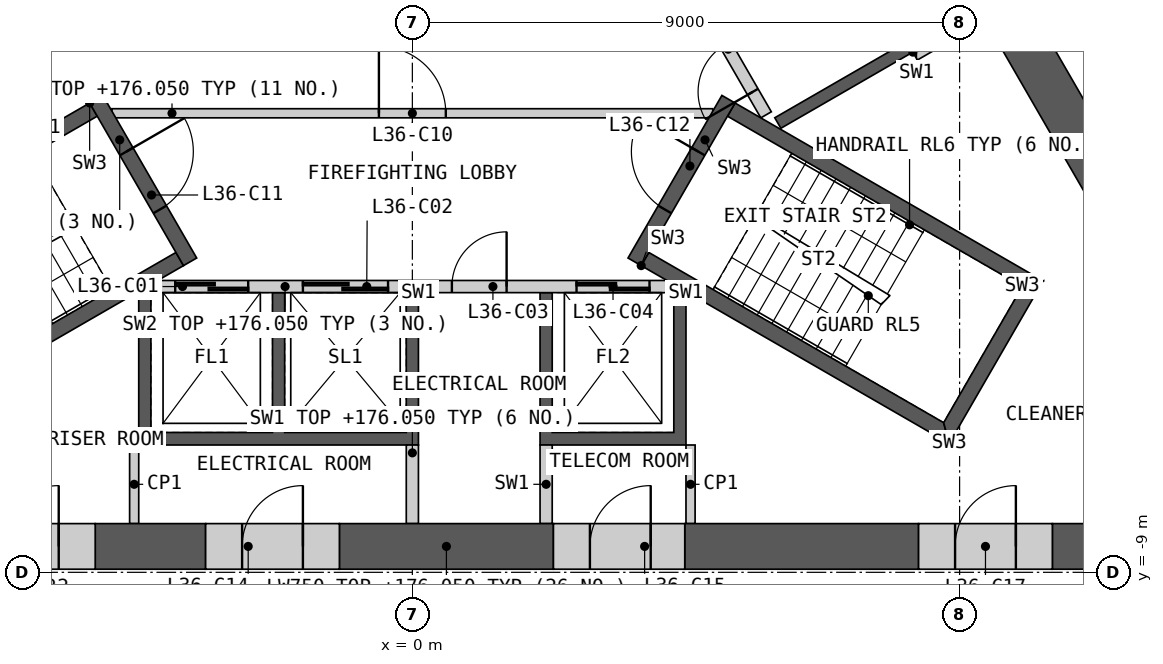
"""IFC4 building model, lengths in metres.
Left out: names, types, materials, properties, quantities, classifications, styles, units other than length and angle.
Written with IfcOpenShell. Run it as: python <this file> out.ifc"""

import sys

from ifc_helpers import new_model, si_unit, direction, frame, frame_2d, origin, place, context, subcontext, project, spatial, polyline, rectangle, outline, extrude, element, fill, save


model = new_model("IFC4")
c1 = context("Model", 3, precision=1e-05, world=origin(), true_north=direction((0.0, 1.0)))
c2 = subcontext(c1, "Body", "Model", "MODEL_VIEW")
j1 = project(units=[si_unit("LENGTHUNIT", "METRE"), si_unit("PLANEANGLEUNIT", "RADIAN")], contexts=[c1])
p1 = place(None, origin())
s1 = spatial("IfcSite", under=j1, at=p1, CompositionType="ELEMENT")
p2 = place(p1, origin())
s2 = spatial("IfcBuilding", under=s1, at=p2, CompositionType="ELEMENT")
p3 = place(p2, frame((0.0, 0.0, 172.8)))
s3 = spatial("IfcBuildingStorey", under=s2, at=p3, CompositionType="ELEMENT", Elevation=172.8)
p4 = place(p3, origin())
e1 = element("IfcWall", 1, at=p4, inside=s3, PredefinedType="SHEAR", context=c2, shape_type="SweptSolid", body=[
    extrude(outline(polyline([(4.5, -4.4), (4.5, -6.906), (2.1, -6.906), (2.1, -4.4), (2.3, -4.4), (2.3, -6.7), (4.3, -6.7), (4.3, -4.4), (4.5, -4.4)])), origin(), (0.0, 0.0, 1.0), 3.25),
])
p5 = place(p3, origin())
e2 = element("IfcWall", 2, at=p5, inside=s3, PredefinedType="SHEAR", context=c2, shape_type="SweptSolid", body=[
    extrude(outline(polyline([(0.1, -4.4), (0.1, -6.906), (-4.5, -6.906), (-4.5, -4.4), (-4.3, -4.4), (-4.3, -6.7), (-2.3, -6.7), (-2.3, -4.4), (-2.1, -4.4), (-2.1, -6.7), (-0.1, -6.7), (-0.1, -4.4), (0.1, -4.4)])), origin(), (0.0, 0.0, 1.0), 3.25),
])
p6 = place(p3, frame((-4.187, -4.3, 0.0), z_axis=(0.0, 0.0, 1.0), x_axis=(1.0, 0.0, 0.0)))
e3 = element("IfcWall", 3, at=p6, inside=s3, PredefinedType="SOLIDWALL", context=c2, shape_type="SweptSolid", body=[
    extrude(rectangle(XDim=8.373, YDim=0.2, at=frame_2d((4.187, 0.0))), origin(), (0.0, 0.0, 1.0), 3.25),
])
p7 = place(p6, frame((0.287, 0.0, 0.0)))
e4 = element("IfcOpeningElement", 4, at=p7, cuts=e3, PredefinedType="OPENING", context=c2, shape_type="SweptSolid", body=[
    extrude(rectangle(XDim=1.2, YDim=2.1, at=frame_2d((0.6, 1.05))), frame((0.0, 0.11, 0.0), z_axis=(0.0, -1.0, 0.0), x_axis=(1.0, 0.0, 0.0)), (0.0, 0.0, 1.0), 0.22),
])
p8 = place(p6, frame((2.387, 0.0, 0.0)))
e5 = element("IfcOpeningElement", 5, at=p8, cuts=e3, PredefinedType="OPENING", context=c2, shape_type="SweptSolid", body=[
    extrude(rectangle(XDim=1.4, YDim=2.1, at=frame_2d((0.7, 1.05))), frame((0.0, 0.11, 0.0), z_axis=(0.0, -1.0, 0.0), x_axis=(1.0, 0.0, 0.0)), (0.0, 0.0, 1.0), 0.22),
])
p9 = place(p6, frame((4.837, 0.0, 0.0)))
e6 = element("IfcOpeningElement", 6, at=p9, cuts=e3, PredefinedType="OPENING", context=c2, shape_type="SweptSolid", body=[
    extrude(rectangle(XDim=0.9, YDim=2.1, at=frame_2d((0.45, 1.05))), frame((0.0, 0.11, 0.0), z_axis=(0.0, -1.0, 0.0), x_axis=(1.0, 0.0, 0.0)), (0.0, 0.0, 1.0), 0.22),
])
p10 = place(p6, frame((6.887, 0.0, 0.0)))
e7 = element("IfcOpeningElement", 7, at=p10, cuts=e3, PredefinedType="OPENING", context=c2, shape_type="SweptSolid", body=[
    extrude(rectangle(XDim=1.2, YDim=2.1, at=frame_2d((0.6, 1.05))), frame((0.0, 0.11, 0.0), z_axis=(0.0, -1.0, 0.0), x_axis=(1.0, 0.0, 0.0)), (0.0, 0.0, 1.0), 0.22),
])
for number, where, z_axis, x_axis in (
    (8, (0.0, -6.906, 0.0), (0.0, 0.0, 1.0), (0.0, -1.0, 0.0)),
    (9, (2.2, -6.906, 0.0), (0.0, 0.0, 1.0), (0.0, -1.0, 0.0)),
):
    element("IfcWall", number, at=place(p3, frame(where, z_axis=z_axis, x_axis=x_axis)), inside=s3, PredefinedType="SHEAR", context=c2, shape_type="SweptSolid", body=[
        extrude(rectangle(XDim=1.293, YDim=0.2, at=frame_2d((0.646, 0.0))), origin(), (0.0, 0.0, 1.0), 3.25),
    ])
p11 = place(p3, origin())
e10 = element("IfcWall", 10, at=p11, inside=s3, PredefinedType="SHEAR", context=c2, shape_type="SweptSolid", body=[
    extrude(outline(polyline([(8.231, -0.444), (6.061, -1.697), (5.96, -1.524), (8.131, -0.271), (8.231, -0.444)])), origin(), (0.0, 0.0, 1.0), 3.25),
])
p12 = place(p3, frame((5.817, -1.476, 0.0), z_axis=(0.0, 0.0, 1.0), x_axis=(-0.500002616675, 0.866023893041, 0.0)))
e11 = element("IfcWall", 11, at=p12, inside=s3, PredefinedType="SOLIDWALL", context=c2, shape_type="SweptSolid", body=[
    extrude(rectangle(XDim=8.373, YDim=0.2, at=frame_2d((4.187, 0.0))), origin(), (0.0, 0.0, 1.0), 3.25),
])
p13 = place(p12, frame((0.437, 0.0, 0.0)))
e12 = element("IfcOpeningElement", 12, at=p13, cuts=e11, PredefinedType="OPENING", context=c2, shape_type="SweptSolid", body=[
    extrude(rectangle(XDim=0.9, YDim=2.1, at=frame_2d((0.45, 1.05))), frame((0.0, 0.11, 0.0), z_axis=(0.0, -1.0, 0.0), x_axis=(1.0, 0.0, 0.0)), (0.0, 0.0, 1.0), 0.22),
])
p14 = place(p12, frame((3.737, 0.0, 0.0)))
e13 = element("IfcOpeningElement", 13, at=p14, cuts=e11, PredefinedType="OPENING", context=c2, shape_type="SweptSolid", body=[
    extrude(rectangle(XDim=0.9, YDim=2.1, at=frame_2d((0.45, 1.05))), frame((0.0, 0.11, 0.0), z_axis=(0.0, -1.0, 0.0), x_axis=(1.0, 0.0, 0.0)), (0.0, 0.0, 1.0), 0.22),
])
p15 = place(p12, frame((6.937, 0.0, 0.0)))
e14 = element("IfcOpeningElement", 14, at=p15, cuts=e11, PredefinedType="OPENING", context=c2, shape_type="SweptSolid", body=[
    extrude(rectangle(XDim=1.1, YDim=2.1, at=frame_2d((0.55, 1.05))), frame((0.0, 0.11, 0.0), z_axis=(0.0, -1.0, 0.0), x_axis=(1.0, 0.0, 0.0)), (0.0, 0.0, 1.0), 0.22),
])
p16 = place(p3, frame((-4.941, -1.45, 0.0), z_axis=(0.0, 0.0, 1.0), x_axis=(1.0, 0.0, 0.0)))
e15 = element("IfcWall", 15, at=p16, inside=s3, PredefinedType="PARTITIONING", context=c2, shape_type="SweptSolid", body=[
    extrude(rectangle(XDim=9.882, YDim=0.15, at=frame_2d((4.941, 0.0))), origin(), (0.0, 0.0, 1.0), 3.25),
])
p17 = place(p16, frame((4.391, 0.0, 0.0)))
e16 = element("IfcOpeningElement", 16, at=p17, cuts=e15, PredefinedType="OPENING", context=c2, shape_type="SweptSolid", body=[
    extrude(rectangle(XDim=1.1, YDim=2.1, at=frame_2d((0.55, 1.05))), frame((0.0, 0.085, 0.0), z_axis=(0.0, -1.0, 0.0), x_axis=(1.0, 0.0, 0.0)), (0.0, 0.0, 1.0), 0.17),
])
p18 = place(p3, origin())
e17 = element("IfcWall", 17, at=p18, inside=s3, PredefinedType="SHEAR", context=c2, shape_type="SweptSolid", body=[
    extrude(outline(polyline([(-5.307, -1.281), (-10.374, -4.206), (-10.032, -4.298), (-5.182, -1.498), (-5.307, -1.281)])), origin(), (0.0, 0.0, 1.0), 3.25),
])
p19 = place(p3, origin())
e18 = element("IfcWall", 18, at=p19, inside=s3, PredefinedType="SHEAR", context=c2, shape_type="SweptSolid", body=[
    extrude(outline(polyline([(-8.738, -6.539), (-8.83, -6.881), (-3.763, -3.956), (-3.888, -3.739), (-8.738, -6.539)])), origin(), (0.0, 0.0, 1.0), 3.25),
])
p20 = place(p3, frame((-5.199, -1.219, 0.0), z_axis=(0.0, 0.0, 1.0), x_axis=(0.499982516597, -0.866035497597, 0.0)))
e19 = element("IfcWall", 19, at=p20, inside=s3, PredefinedType="SHEAR", context=c2, shape_type="SweptSolid", body=[
    extrude(rectangle(XDim=3.088, YDim=0.25, at=frame_2d((1.544, 0.0))), origin(), (0.0, 0.0, 1.0), 3.25),
])
p21 = place(p20, frame((0.994, 0.0, 0.0)))
e20 = element("IfcOpeningElement", 20, at=p21, cuts=e19, PredefinedType="OPENING", context=c2, shape_type="SweptSolid", body=[
    extrude(rectangle(XDim=1.1, YDim=2.1, at=frame_2d((0.55, 1.05))), frame((0.0, 0.135, 0.0), z_axis=(0.0, -1.0, 0.0), x_axis=(1.0, 0.0, 0.0)), (0.0, 0.0, 1.0), 0.27),
])
p22 = place(p3, origin())
e21 = element("IfcWall", 21, at=p22, inside=s3, PredefinedType="SHEAR", context=c2, shape_type="SweptSolid", body=[
    extrude(outline(polyline([(3.763, -3.956), (8.83, -6.881), (8.738, -6.539), (3.888, -3.739), (3.763, -3.956)])), origin(), (0.0, 0.0, 1.0), 3.25),
])
p23 = place(p3, origin())
e22 = element("IfcWall", 22, at=p23, inside=s3, PredefinedType="SHEAR", context=c2, shape_type="SweptSolid", body=[
    extrude(outline(polyline([(8.83, -6.881), (10.374, -4.206), (10.032, -4.298), (8.738, -6.539), (8.83, -6.881)])), origin(), (0.0, 0.0, 1.0), 3.25),
])
p24 = place(p3, origin())
e23 = element("IfcWall", 23, at=p24, inside=s3, PredefinedType="SHEAR", context=c2, shape_type="SweptSolid", body=[
    extrude(outline(polyline([(10.032, -4.298), (10.374, -4.206), (5.307, -1.281), (5.182, -1.498), (10.032, -4.298)])), origin(), (0.0, 0.0, 1.0), 3.25),
])
p25 = place(p3, frame((3.655, -3.893, 0.0), z_axis=(0.0, 0.0, 1.0), x_axis=(0.499982516597, 0.866035497597, 0.0)))
e24 = element("IfcWall", 24, at=p25, inside=s3, PredefinedType="SHEAR", context=c2, shape_type="SweptSolid", body=[
    extrude(rectangle(XDim=3.088, YDim=0.25, at=frame_2d((1.544, 0.0))), origin(), (0.0, 0.0, 1.0), 3.25),
])
p26 = place(p25, frame((0.994, 0.0, 0.0)))
e25 = element("IfcOpeningElement", 25, at=p26, cuts=e24, PredefinedType="OPENING", context=c2, shape_type="SweptSolid", body=[
    extrude(rectangle(XDim=1.1, YDim=2.1, at=frame_2d((0.55, 1.05))), frame((0.0, 0.135, 0.0), z_axis=(0.0, -1.0, 0.0), x_axis=(1.0, 0.0, 0.0)), (0.0, 0.0, 1.0), 0.27),
])
for number, where, z_axis, x_axis in (
    (26, (4.575, -6.906, 0.0), (0.0, 0.0, 1.0), (0.0, -1.0, 0.0)),
    (27, (-4.575, -6.906, 0.0), (0.0, 0.0, 1.0), (0.0, -1.0, 0.0)),
    (28, (8.268, -0.509, 0.0), (0.0, 0.0, 1.0), (0.866, 0.5, 0.0)),
):
    element("IfcWall", number, at=place(p3, frame(where, z_axis=z_axis, x_axis=x_axis)), inside=s3, PredefinedType="PARTITIONING", context=c2, shape_type="SweptSolid", body=[
        extrude(rectangle(XDim=1.293, YDim=0.15, at=frame_2d((0.646, 0.0))), origin(), (0.0, 0.0, 1.0), 3.25),
    ])
p27 = place(p3, frame((4.48, -8.574, 0.0), z_axis=(0.0, 0.0, 1.0), x_axis=(1.0, 0.0, 0.0)))
e29 = element("IfcWall", 29, at=p27, inside=s3, PredefinedType="SHEAR", context=c2, shape_type="SweptSolid", body=[
    extrude(rectangle(XDim=3.845, YDim=0.75, at=frame_2d((1.923, 0.0))), origin(), (0.0, 0.0, 1.0), 3.25),
])
p28 = place(p3, frame((10.525, -8.574, 0.0), z_axis=(0.0, 0.0, 1.0), x_axis=(1.0, 0.0, 0.0)))
e30 = element("IfcWall", 30, at=p28, inside=s3, PredefinedType="SHEAR", context=c2, shape_type="SweptSolid", body=[
    extrude(rectangle(XDim=3.676, YDim=0.75, at=frame_2d((1.838, 0.0))), origin(), (0.0, 0.0, 1.0), 3.25),
])
p29 = place(p3, frame((-1.2, -8.574, 0.0), z_axis=(0.0, 0.0, 1.0), x_axis=(1.0, 0.0, 0.0)))
e31 = element("IfcWall", 31, at=p29, inside=s3, PredefinedType="SHEAR", context=c2, shape_type="SweptSolid", body=[
    extrude(rectangle(XDim=3.52, YDim=0.75, at=frame_2d((1.76, 0.0))), origin(), (0.0, 0.0, 1.0), 3.25),
])
p30 = place(p3, frame((-5.216, -8.574, 0.0), z_axis=(0.0, 0.0, 1.0), x_axis=(1.0, 0.0, 0.0)))
e32 = element("IfcWall", 32, at=p30, inside=s3, PredefinedType="SHEAR", context=c2, shape_type="SweptSolid", body=[
    extrude(rectangle(XDim=1.816, YDim=0.75, at=frame_2d((0.908, 0.0))), origin(), (0.0, 0.0, 1.0), 3.25),
])
p31 = place(p3, frame((14.526, -8.011, 0.0), z_axis=(0.0, 0.0, 1.0), x_axis=(-0.499994855372, 0.866028374016, 0.0)))
e33 = element("IfcWall", 33, at=p31, inside=s3, PredefinedType="SHEAR", context=c2, shape_type="SweptSolid", body=[
    extrude(rectangle(XDim=14.301, YDim=0.75, at=frame_2d((7.15, 0.0))), origin(), (0.0, 0.0, 1.0), 3.25),
])
p32 = place(p3, frame((-3.4, -8.574, 0.0), z_axis=(0.0, 0.0, 1.0), x_axis=(1.0, 0.0, 0.0)))
e34 = element("IfcWall", 34, at=p32, inside=s3, PredefinedType="SHEAR", context=c2, shape_type="SweptSolid", body=[
    extrude(rectangle(XDim=2.2, YDim=0.75, at=frame_2d((1.1, 0.0))), origin(), (0.0, 0.0, 1.0), 3.25),
])
p33 = place(p32, frame((0.6, 0.0, 0.0)))
e35 = element("IfcOpeningElement", 35, at=p33, cuts=e34, PredefinedType="OPENING", context=c2, shape_type="SweptSolid", body=[
    extrude(rectangle(XDim=1.0, YDim=2.1, at=frame_2d((0.5, 1.05))), frame((0.0, 0.385, 0.0), z_axis=(0.0, -1.0, 0.0), x_axis=(1.0, 0.0, 0.0)), (0.0, 0.0, 1.0), 0.77),
])
p34 = place(p3, frame((2.32, -8.574, 0.0), z_axis=(0.0, 0.0, 1.0), x_axis=(1.0, 0.0, 0.0)))
e36 = element("IfcWall", 36, at=p34, inside=s3, PredefinedType="SHEAR", context=c2, shape_type="SweptSolid", body=[
    extrude(rectangle(XDim=2.16, YDim=0.75, at=frame_2d((1.08, 0.0))), origin(), (0.0, 0.0, 1.0), 3.25),
])
p35 = place(p34, frame((0.6, 0.0, 0.0)))
e37 = element("IfcOpeningElement", 37, at=p35, cuts=e36, PredefinedType="OPENING", context=c2, shape_type="SweptSolid", body=[
    extrude(rectangle(XDim=1.0, YDim=2.1, at=frame_2d((0.5, 1.05))), frame((0.0, 0.385, 0.0), z_axis=(0.0, -1.0, 0.0), x_axis=(1.0, 0.0, 0.0)), (0.0, 0.0, 1.0), 0.77),
])
p36 = place(p3, frame((8.325, -8.574, 0.0), z_axis=(0.0, 0.0, 1.0), x_axis=(1.0, 0.0, 0.0)))
e38 = element("IfcWall", 38, at=p36, inside=s3, PredefinedType="SHEAR", context=c2, shape_type="SweptSolid", body=[
    extrude(rectangle(XDim=2.2, YDim=0.75, at=frame_2d((1.1, 0.0))), origin(), (0.0, 0.0, 1.0), 3.25),
])
p37 = place(p36, frame((0.6, 0.0, 0.0)))
e39 = element("IfcOpeningElement", 39, at=p37, cuts=e38, PredefinedType="OPENING", context=c2, shape_type="SweptSolid", body=[
    extrude(rectangle(XDim=1.0, YDim=2.1, at=frame_2d((0.5, 1.05))), frame((0.0, 0.385, 0.0), z_axis=(0.0, -1.0, 0.0), x_axis=(1.0, 0.0, 0.0)), (0.0, 0.0, 1.0), 0.77),
])
p38 = place(p3, frame((-7.416, -8.574, 0.0), z_axis=(0.0, 0.0, 1.0), x_axis=(1.0, 0.0, 0.0)))
e40 = element("IfcWall", 40, at=p38, inside=s3, PredefinedType="SHEAR", context=c2, shape_type="SweptSolid", body=[
    extrude(rectangle(XDim=2.2, YDim=0.75, at=frame_2d((1.1, 0.0))), origin(), (0.0, 0.0, 1.0), 3.25),
])
p39 = place(p38, frame((0.6, 0.0, 0.0)))
e41 = element("IfcOpeningElement", 41, at=p39, cuts=e40, PredefinedType="OPENING", context=c2, shape_type="SweptSolid", body=[
    extrude(rectangle(XDim=1.0, YDim=2.1, at=frame_2d((0.5, 1.05))), frame((0.0, 0.385, 0.0), z_axis=(0.0, -1.0, 0.0), x_axis=(1.0, 0.0, 0.0)), (0.0, 0.0, 1.0), 0.77),
])
p40 = place(p7, origin())
e42 = element("IfcDoor", 42, at=p40, inside=s3, OperationType="SLIDING_TO_LEFT", PredefinedType="DOOR", context=c2, shape_type="SweptSolid", body=[
    extrude(rectangle(XDim=1.2, YDim=2.1, at=frame_2d((0.6, 1.05))), frame((0.0, 0.025, 0.0), z_axis=(0.0, -1.0, 0.0), x_axis=(1.0, 0.0, 0.0)), (0.0, 0.0, 1.0), 0.05),
])
fill(e4, e42)
p41 = place(p8, origin())
e43 = element("IfcDoor", 43, at=p41, inside=s3, OperationType="SLIDING_TO_LEFT", PredefinedType="DOOR", context=c2, shape_type="SweptSolid", body=[
    extrude(rectangle(XDim=1.4, YDim=2.1, at=frame_2d((0.7, 1.05))), frame((0.0, 0.025, 0.0), z_axis=(0.0, -1.0, 0.0), x_axis=(1.0, 0.0, 0.0)), (0.0, 0.0, 1.0), 0.05),
])
fill(e5, e43)
p42 = place(p9, origin())
e44 = element("IfcDoor", 44, at=p42, inside=s3, OperationType="SINGLE_SWING_RIGHT", PredefinedType="DOOR", context=c2, shape_type="SweptSolid", body=[
    extrude(rectangle(XDim=0.9, YDim=2.1, at=frame_2d((0.45, 1.05))), frame((0.0, 0.025, 0.0), z_axis=(0.0, -1.0, 0.0), x_axis=(1.0, 0.0, 0.0)), (0.0, 0.0, 1.0), 0.05),
])
fill(e6, e44)
p43 = place(p10, origin())
e45 = element("IfcDoor", 45, at=p43, inside=s3, OperationType="SLIDING_TO_LEFT", PredefinedType="DOOR", context=c2, shape_type="SweptSolid", body=[
    extrude(rectangle(XDim=1.2, YDim=2.1, at=frame_2d((0.6, 1.05))), frame((0.0, 0.025, 0.0), z_axis=(0.0, -1.0, 0.0), x_axis=(1.0, 0.0, 0.0)), (0.0, 0.0, 1.0), 0.05),
])
fill(e7, e45)
p44 = place(p13, origin())
e46 = element("IfcDoor", 46, at=p44, inside=s3, OperationType="SINGLE_SWING_LEFT", PredefinedType="DOOR", context=c2, shape_type="SweptSolid", body=[
    extrude(rectangle(XDim=0.9, YDim=2.1, at=frame_2d((0.45, 1.05))), frame((0.0, 0.025, 0.0), z_axis=(0.0, -1.0, 0.0), x_axis=(1.0, 0.0, 0.0)), (0.0, 0.0, 1.0), 0.05),
])
fill(e12, e46)
p45 = place(p17, origin())
e47 = element("IfcDoor", 47, at=p45, inside=s3, OperationType="SINGLE_SWING_LEFT", PredefinedType="DOOR", context=c2, shape_type="SweptSolid", body=[
    extrude(rectangle(XDim=1.1, YDim=2.1, at=frame_2d((0.55, 1.05))), frame((0.0, 0.025, 0.0), z_axis=(0.0, -1.0, 0.0), x_axis=(1.0, 0.0, 0.0)), (0.0, 0.0, 1.0), 0.05),
])
fill(e16, e47)
p46 = place(p21, origin())
e48 = element("IfcDoor", 48, at=p46, inside=s3, OperationType="SINGLE_SWING_LEFT", PredefinedType="DOOR", context=c2, shape_type="SweptSolid", body=[
    extrude(rectangle(XDim=1.1, YDim=2.1, at=frame_2d((0.55, 1.05))), frame((0.0, 0.025, 0.0), z_axis=(0.0, -1.0, 0.0), x_axis=(1.0, 0.0, 0.0)), (0.0, 0.0, 1.0), 0.05),
])
fill(e20, e48)
p47 = place(p26, origin())
e49 = element("IfcDoor", 49, at=p47, inside=s3, OperationType="SINGLE_SWING_RIGHT", PredefinedType="DOOR", context=c2, shape_type="SweptSolid", body=[
    extrude(rectangle(XDim=1.1, YDim=2.1, at=frame_2d((0.55, 1.05))), frame((0.0, 0.025, 0.0), z_axis=(0.0, -1.0, 0.0), x_axis=(1.0, 0.0, 0.0)), (0.0, 0.0, 1.0), 0.05),
])
fill(e25, e49)
p48 = place(p33, origin())
e50 = element("IfcDoor", 50, at=p48, inside=s3, OperationType="SINGLE_SWING_RIGHT", PredefinedType="DOOR", context=c2, shape_type="SweptSolid", body=[
    extrude(rectangle(XDim=1.0, YDim=2.1, at=frame_2d((0.5, 1.05))), frame((0.0, 0.13, 0.0), z_axis=(0.0, -1.0, 0.0), x_axis=(1.0, 0.0, 0.0)), (0.0, 0.0, 1.0), 0.05),
])
fill(e35, e50)
p49 = place(p35, origin())
e51 = element("IfcDoor", 51, at=p49, inside=s3, OperationType="SINGLE_SWING_RIGHT", PredefinedType="DOOR", context=c2, shape_type="SweptSolid", body=[
    extrude(rectangle(XDim=1.0, YDim=2.1, at=frame_2d((0.5, 1.05))), frame((0.0, 0.13, 0.0), z_axis=(0.0, -1.0, 0.0), x_axis=(1.0, 0.0, 0.0)), (0.0, 0.0, 1.0), 0.05),
])
fill(e37, e51)
p50 = place(p37, origin())
e52 = element("IfcDoor", 52, at=p50, inside=s3, OperationType="SINGLE_SWING_RIGHT", PredefinedType="DOOR", context=c2, shape_type="SweptSolid", body=[
    extrude(rectangle(XDim=1.0, YDim=2.1, at=frame_2d((0.5, 1.05))), frame((0.0, 0.13, 0.0), z_axis=(0.0, -1.0, 0.0), x_axis=(1.0, 0.0, 0.0)), (0.0, 0.0, 1.0), 0.05),
])
fill(e39, e52)
p51 = place(p39, origin())
e53 = element("IfcDoor", 53, at=p51, inside=s3, OperationType="SINGLE_SWING_RIGHT", PredefinedType="DOOR", context=c2, shape_type="SweptSolid", body=[
    extrude(rectangle(XDim=1.0, YDim=2.1, at=frame_2d((0.5, 1.05))), frame((0.0, 0.13, 0.0), z_axis=(0.0, -1.0, 0.0), x_axis=(1.0, 0.0, 0.0)), (0.0, 0.0, 1.0), 0.05),
])
fill(e41, e53)
save(model, sys.argv[1])
